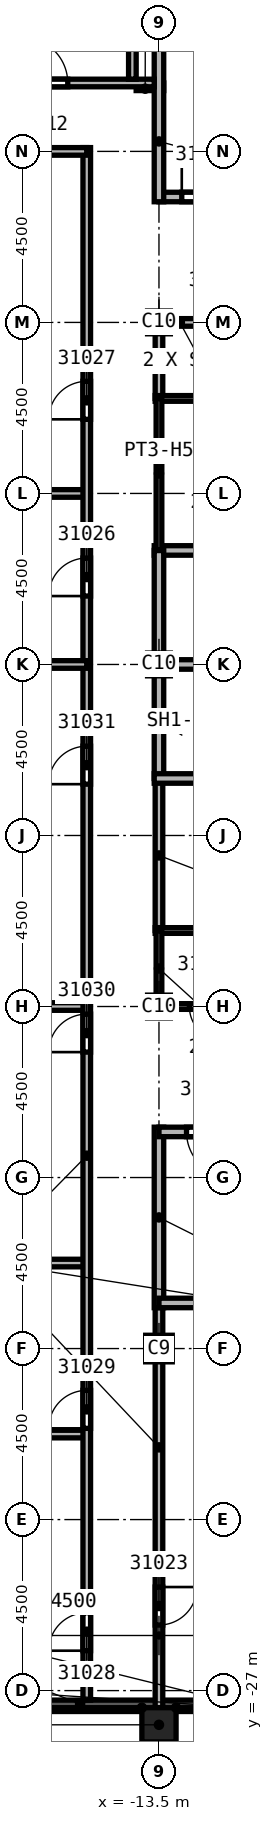
"""IFC4 building model, lengths in metres.
Left out: names, types, materials, properties, quantities, classifications, styles, units other than length and angle.
Written with IfcOpenShell. Run it as: python <this file> out.ifc"""

import sys

from ifc_helpers import new_model, si_unit, direction, frame, frame_2d, origin, origin_2d, place, context, subcontext, project, spatial, rectangle, extrude, element, fill, save


model = new_model("IFC4")
c1 = context("Model", 3, precision=1e-05, world=origin(), true_north=direction((0.0, 1.0)))
c2 = subcontext(c1, "Body", "Model", "MODEL_VIEW")
j1 = project(units=[si_unit("LENGTHUNIT", "METRE"), si_unit("PLANEANGLEUNIT", "RADIAN")], contexts=[c1])
p1 = place(None, origin())
s1 = spatial("IfcSite", under=j1, at=p1, CompositionType="ELEMENT")
p2 = place(p1, origin())
s2 = spatial("IfcBuilding", under=s1, at=p2, CompositionType="ELEMENT")
p3 = place(p2, frame((0.0, 0.0, 350.0)))
s3 = spatial("IfcBuildingStorey", under=s2, at=p3, CompositionType="ELEMENT", Elevation=350.0)
p4 = place(p3, frame((-13.5, -18.0, 0.0), z_axis=(0.0, 0.0, 1.0), x_axis=(1.0, 0.0, 0.0)))
e1 = element("IfcColumn", 1, at=p4, inside=s3, PredefinedType="COLUMN", context=c2, shape_type="SweptSolid", body=[
    extrude(rectangle(XDim=0.7, YDim=0.7, at=origin_2d()), origin(), (0.0, 0.0, 1.0), 5.6),
])
for number, where, z_axis, x_axis in (
    (2, (-13.5, 0.0, 0.0), (0.0, 0.0, 1.0), (1.0, 0.0, 0.0)),
    (3, (-13.5, 9.0, 0.0), (0.0, 0.0, 1.0), (1.0, 0.0, 0.0)),
    (4, (-13.5, -9.0, 0.0), (0.0, 0.0, 1.0), (1.0, 0.0, 0.0)),
):
    element("IfcColumn", number, at=place(p3, frame(where, z_axis=z_axis, x_axis=x_axis)), inside=s3, PredefinedType="COLUMN", context=c2, shape_type="SweptSolid", body=[
        extrude(rectangle(XDim=0.6, YDim=0.6, at=origin_2d()), origin(), (0.0, 0.0, 1.0), 5.6),
    ])
p5 = place(p3, frame((-13.5, -27.9, 0.0), z_axis=(0.0, 0.0, 1.0), x_axis=(1.0, 0.0, 0.0)))
e5 = element("IfcColumn", 5, at=p5, inside=s3, PredefinedType="COLUMN", context=c2, shape_type="SweptSolid", body=[
    extrude(rectangle(XDim=0.9, YDim=0.9, at=origin_2d()), origin(), (0.0, 0.0, 1.0), 5.6),
])
for number, where, z_axis, x_axis in (
    (6, (-17.55, -27.4, 0.0), (0.0, 0.0, 1.0), (1.0, 0.0, 0.0)),
    (7, (-13.45, -27.4, 0.0), (0.0, 0.0, 1.0), (1.0, 0.0, 0.0)),
):
    element("IfcWall", number, at=place(p3, frame(where, z_axis=z_axis, x_axis=x_axis)), inside=s3, PredefinedType="SOLIDWALL", context=c2, shape_type="SweptSolid", body=[
        extrude(rectangle(XDim=4.0, YDim=0.3, at=frame_2d((2.0, 0.0))), origin(), (0.0, 0.0, 1.0), 1.1),
    ])
p6 = place(p3, frame((-26.55, -9.0, 0.0), z_axis=(0.0, 0.0, 1.0), x_axis=(1.0, 0.0, 0.0)))
e8 = element("IfcWall", 8, at=p6, inside=s3, PredefinedType="PARTITIONING", context=c2, shape_type="SweptSolid", body=[
    extrude(rectangle(XDim=11.15, YDim=0.2, at=frame_2d((5.575, 0.0))), origin(), (0.0, 0.0, 1.0), 5.6),
])
p7 = place(p3, frame((-26.35, 4.5, 0.0), z_axis=(0.0, 0.0, 1.0), x_axis=(1.0, 0.0, 0.0)))
e9 = element("IfcWall", 9, at=p7, inside=s3, PredefinedType="PARTITIONING", context=c2, shape_type="SweptSolid", body=[
    extrude(rectangle(XDim=10.95, YDim=0.2, at=frame_2d((5.475, 0.0))), origin(), (0.0, 0.0, 1.0), 5.6),
])
p8 = place(p3, frame((-24.1, -20.25, 0.0), z_axis=(0.0, 0.0, 1.0), x_axis=(1.0, 0.0, 0.0)))
e10 = element("IfcWall", 10, at=p8, inside=s3, PredefinedType="PARTITIONING", context=c2, shape_type="SweptSolid", body=[
    extrude(rectangle(XDim=8.7, YDim=0.2, at=frame_2d((4.35, 0.0))), origin(), (0.0, 0.0, 1.0), 5.6),
])
p9 = place(p3, frame((-20.75, -15.75, 0.0), z_axis=(0.0, 0.0, 1.0), x_axis=(1.0, 0.0, 0.0)))
e11 = element("IfcWall", 11, at=p9, inside=s3, PredefinedType="PARTITIONING", context=c2, shape_type="SweptSolid", body=[
    extrude(rectangle(XDim=5.35, YDim=0.2, at=frame_2d((2.675, 0.0))), origin(), (0.0, 0.0, 1.0), 5.6),
])
p10 = place(p3, frame((-15.4, -27.25, 0.0), z_axis=(0.0, 0.0, 1.0), x_axis=(0.0, 1.0, 0.0)))
e12 = element("IfcWall", 12, at=p10, inside=s3, PredefinedType="PARTITIONING", context=c2, shape_type="SweptSolid", body=[
    extrude(rectangle(XDim=40.85, YDim=0.2, at=frame_2d((20.425, 0.0))), origin(), (0.0, 0.0, 1.0), 5.6),
])
p11 = place(p10, frame((29.05, 0.0, 0.0)))
e13 = element("IfcOpeningElement", 13, at=p11, cuts=e12, PredefinedType="OPENING", context=c2, shape_type="SweptSolid", body=[
    extrude(rectangle(XDim=1.0, YDim=2.1, at=frame_2d((0.5, 1.05))), frame((0.0, 0.1, 0.0), z_axis=(0.0, -1.0, 0.0), x_axis=(1.0, 0.0, 0.0)), (0.0, 0.0, 1.0), 0.2),
])
p12 = place(p10, frame((33.7, 0.0, 0.0)))
e14 = element("IfcOpeningElement", 14, at=p12, cuts=e12, PredefinedType="OPENING", context=c2, shape_type="SweptSolid", body=[
    extrude(rectangle(XDim=1.0, YDim=2.1, at=frame_2d((0.5, 1.05))), frame((0.0, 0.1, 0.0), z_axis=(0.0, -1.0, 0.0), x_axis=(1.0, 0.0, 0.0)), (0.0, 0.0, 1.0), 0.2),
])
p13 = place(p10, frame((1.3, 0.0, 0.0)))
e15 = element("IfcOpeningElement", 15, at=p13, cuts=e12, PredefinedType="OPENING", context=c2, shape_type="SweptSolid", body=[
    extrude(rectangle(XDim=1.0, YDim=2.1, at=frame_2d((0.5, 1.05))), frame((0.0, 0.1, 0.0), z_axis=(0.0, -1.0, 0.0), x_axis=(1.0, 0.0, 0.0)), (0.0, 0.0, 1.0), 0.2),
])
p14 = place(p10, frame((7.15, 0.0, 0.0)))
e16 = element("IfcOpeningElement", 16, at=p14, cuts=e12, PredefinedType="OPENING", context=c2, shape_type="SweptSolid", body=[
    extrude(rectangle(XDim=1.0, YDim=2.1, at=frame_2d((0.5, 1.05))), frame((0.0, 0.1, 0.0), z_axis=(0.0, -1.0, 0.0), x_axis=(1.0, 0.0, 0.0)), (0.0, 0.0, 1.0), 0.2),
])
p15 = place(p10, frame((17.05, 0.0, 0.0)))
e17 = element("IfcOpeningElement", 17, at=p15, cuts=e12, PredefinedType="OPENING", context=c2, shape_type="SweptSolid", body=[
    extrude(rectangle(XDim=1.0, YDim=2.1, at=frame_2d((0.5, 1.05))), frame((0.0, 0.1, 0.0), z_axis=(0.0, -1.0, 0.0), x_axis=(1.0, 0.0, 0.0)), (0.0, 0.0, 1.0), 0.2),
])
p16 = place(p10, frame((24.1, 0.0, 0.0)))
e18 = element("IfcOpeningElement", 18, at=p16, cuts=e12, PredefinedType="OPENING", context=c2, shape_type="SweptSolid", body=[
    extrude(rectangle(XDim=1.0, YDim=2.1, at=frame_2d((0.5, 1.05))), frame((0.0, 0.1, 0.0), z_axis=(0.0, -1.0, 0.0), x_axis=(1.0, 0.0, 0.0)), (0.0, 0.0, 1.0), 0.2),
])
p17 = place(p3, frame((-15.4, 0.0, 0.0), z_axis=(0.0, 0.0, 1.0), x_axis=(-1.0, 0.0, 0.0)))
e19 = element("IfcWall", 19, at=p17, inside=s3, PredefinedType="PARTITIONING", context=c2, shape_type="SweptSolid", body=[
    extrude(rectangle(XDim=11.15, YDim=0.2, at=frame_2d((5.575, 0.0))), origin(), (0.0, 0.0, 1.0), 5.6),
])
p18 = place(p3, frame((-15.4, 13.5, 0.0), z_axis=(0.0, 0.0, 1.0), x_axis=(-1.0, 0.0, 0.0)))
e20 = element("IfcWall", 20, at=p18, inside=s3, PredefinedType="PARTITIONING", context=c2, shape_type="SweptSolid", body=[
    extrude(rectangle(XDim=6.6, YDim=0.2, at=frame_2d((3.3, 0.0))), origin(), (0.0, 0.0, 1.0), 5.6),
])
p19 = place(p3, frame((-14.1, 15.2, 0.0), z_axis=(0.0, 0.0, 1.0), x_axis=(1.0, 0.0, 0.0)))
e21 = element("IfcWall", 21, at=p19, inside=s3, PredefinedType="PARTITIONING", context=c2, shape_type="SweptSolid", body=[
    extrude(rectangle(XDim=0.725, YDim=0.2, at=frame_2d((0.363, 0.0))), origin(), (0.0, 0.0, 1.0), 5.6),
])
p20 = place(p3, frame((-13.5, -16.675, 0.0), z_axis=(0.0, 0.0, 1.0), x_axis=(0.0, -1.0, 0.0)))
e22 = element("IfcWall", 22, at=p20, inside=s3, PredefinedType="PARTITIONING", context=c2, shape_type="SweptSolid", body=[
    extrude(rectangle(XDim=10.775, YDim=0.2, at=frame_2d((5.387, 0.0))), origin(), (0.0, 0.0, 1.0), 5.6),
])
p21 = place(p20, frame((7.6, 0.0, 0.0)))
e23 = element("IfcOpeningElement", 23, at=p21, cuts=e22, PredefinedType="OPENING", context=c2, shape_type="SweptSolid", body=[
    extrude(rectangle(XDim=1.0, YDim=2.1, at=frame_2d((0.5, 1.05))), frame((0.0, 0.1, 0.0), z_axis=(0.0, -1.0, 0.0), x_axis=(1.0, 0.0, 0.0)), (0.0, 0.0, 1.0), 0.2),
])
p22 = place(p3, frame((-13.5, -7.0, 0.0), z_axis=(0.0, 0.0, 1.0), x_axis=(0.0, 1.0, 0.0)))
e24 = element("IfcWall", 24, at=p22, inside=s3, PredefinedType="SOLIDWALL", context=c2, shape_type="SweptSolid", body=[
    extrude(rectangle(XDim=4.0, YDim=0.2, at=frame_2d((2.0, 0.0))), origin(), (0.0, 0.0, 1.0), 4.838),
])
p23 = place(p3, frame((-13.5, 7.0, 0.0), z_axis=(0.0, 0.0, 1.0), x_axis=(0.0, 1.0, 0.0)))
e25 = element("IfcWall", 25, at=p23, inside=s3, PredefinedType="SOLIDWALL", context=c2, shape_type="SweptSolid", body=[
    extrude(rectangle(XDim=2.1, YDim=0.2, at=frame_2d((1.05, 0.0))), origin(), (0.0, 0.0, 1.0), 4.838),
])
p24 = place(p3, frame((-13.5, 9.0, 0.0), z_axis=(0.0, 0.0, 1.0), x_axis=(1.0, 0.0, 0.0)))
e26 = element("IfcWall", 26, at=p24, inside=s3, PredefinedType="SOLIDWALL", context=c2, shape_type="SweptSolid", body=[
    extrude(rectangle(XDim=3.0, YDim=0.2, at=frame_2d((1.5, 0.0))), origin(), (0.0, 0.0, 1.0), 4.838),
])
p25 = place(p24, frame((1.0, 0.0, 0.0)))
e27 = element("IfcOpeningElement", 27, at=p25, cuts=e26, PredefinedType="OPENING", context=c2, shape_type="SweptSolid", body=[
    extrude(rectangle(XDim=1.1, YDim=2.1, at=frame_2d((0.55, 1.05))), frame((0.0, 0.1, 0.0), z_axis=(0.0, -1.0, 0.0), x_axis=(1.0, 0.0, 0.0)), (0.0, 0.0, 1.0), 0.2),
])
p26 = place(p3, frame((-13.625, 0.0, 0.0), z_axis=(0.0, 0.0, 1.0), x_axis=(1.0, 0.0, 0.0)))
e28 = element("IfcWall", 28, at=p26, inside=s3, PredefinedType="SOLIDWALL", context=c2, shape_type="SweptSolid", body=[
    extrude(rectangle(XDim=3.125, YDim=0.25, at=frame_2d((1.562, 0.0))), origin(), (0.0, 0.0, 1.0), 5.6),
])
p27 = place(p3, frame((-13.625, 3.0, 0.0), z_axis=(0.0, 0.0, 1.0), x_axis=(1.0, 0.0, 0.0)))
e29 = element("IfcWall", 29, at=p27, inside=s3, PredefinedType="SOLIDWALL", context=c2, shape_type="SweptSolid", body=[
    extrude(rectangle(XDim=6.125, YDim=0.25, at=frame_2d((3.062, 0.0))), origin(), (0.0, 0.0, 1.0), 5.6),
])
p28 = place(p27, frame((4.0, 0.0, 0.0)))
e30 = element("IfcOpeningElement", 30, at=p28, cuts=e29, PredefinedType="OPENING", context=c2, shape_type="SweptSolid", body=[
    extrude(rectangle(XDim=1.1, YDim=2.1, at=frame_2d((0.55, 1.05))), frame((0.0, 0.125, 0.0), z_axis=(0.0, -1.0, 0.0), x_axis=(1.0, 0.0, 0.0)), (0.0, 0.0, 1.0), 0.25),
])
p29 = place(p3, frame((-13.5, -3.0, 0.0), z_axis=(0.0, 0.0, 1.0), x_axis=(0.0, 1.0, 0.0)))
e31 = element("IfcWall", 31, at=p29, inside=s3, PredefinedType="SOLIDWALL", context=c2, shape_type="SweptSolid", body=[
    extrude(rectangle(XDim=6.0, YDim=0.25, at=frame_2d((3.0, 0.0))), origin(), (0.0, 0.0, 1.0), 4.838),
])
p30 = place(p3, frame((-13.625, -3.0, 0.0), z_axis=(0.0, 0.0, 1.0), x_axis=(1.0, 0.0, 0.0)))
e32 = element("IfcWall", 32, at=p30, inside=s3, PredefinedType="SOLIDWALL", context=c2, shape_type="SweptSolid", body=[
    extrude(rectangle(XDim=6.125, YDim=0.25, at=frame_2d((3.062, 0.0))), origin(), (0.0, 0.0, 1.0), 5.6),
])
p31 = place(p30, frame((4.0, 0.0, 0.0)))
e33 = element("IfcOpeningElement", 33, at=p31, cuts=e32, PredefinedType="OPENING", context=c2, shape_type="SweptSolid", body=[
    extrude(rectangle(XDim=1.1, YDim=2.1, at=frame_2d((0.55, 1.05))), frame((0.0, 0.125, 0.0), z_axis=(0.0, -1.0, 0.0), x_axis=(1.0, 0.0, 0.0)), (0.0, 0.0, 1.0), 0.25),
])
p32 = place(p3, frame((-13.5, -12.175, 0.0), z_axis=(0.0, 0.0, 1.0), x_axis=(0.0, -1.0, 0.0)))
e34 = element("IfcWall", 34, at=p32, inside=s3, PredefinedType="SOLIDWALL", context=c2, shape_type="SweptSolid", body=[
    extrude(rectangle(XDim=4.75, YDim=0.25, at=frame_2d((2.375, 0.0))), origin(), (0.0, 0.0, 1.0), 5.6),
])
p33 = place(p3, frame((-13.5, 12.3, 0.0), z_axis=(0.0, 0.0, 1.0), x_axis=(1.0, 0.0, 0.0)))
e35 = element("IfcWall", 35, at=p33, inside=s3, PredefinedType="SOLIDWALL", context=c2, shape_type="SweptSolid", body=[
    extrude(rectangle(XDim=9.125, YDim=0.25, at=frame_2d((4.562, 0.0))), origin(), (0.0, 0.0, 1.0), 5.6),
])
p34 = place(p33, frame((0.6, 0.0, 0.0)))
e36 = element("IfcOpeningElement", 36, at=p34, cuts=e35, PredefinedType="OPENING", context=c2, shape_type="SweptSolid", body=[
    extrude(rectangle(XDim=1.2, YDim=2.1, at=frame_2d((0.6, 1.05))), frame((0.0, 0.125, 0.0), z_axis=(0.0, -1.0, 0.0), x_axis=(1.0, 0.0, 0.0)), (0.0, 0.0, 1.0), 0.25),
])
p35 = place(p3, frame((-13.5, 12.175, 0.0), z_axis=(0.0, 0.0, 1.0), x_axis=(0.0, 1.0, 0.0)))
e37 = element("IfcWall", 37, at=p35, inside=s3, PredefinedType="SOLIDWALL", context=c2, shape_type="SweptSolid", body=[
    extrude(rectangle(XDim=4.75, YDim=0.25, at=frame_2d((2.375, 0.0))), origin(), (0.0, 0.0, 1.0), 5.6),
])
p36 = place(p3, frame((-4.4, -16.8, 0.0), z_axis=(0.0, 0.0, 1.0), x_axis=(-1.0, 0.0, 0.0)))
e38 = element("IfcWall", 38, at=p36, inside=s3, PredefinedType="SOLIDWALL", context=c2, shape_type="SweptSolid", body=[
    extrude(rectangle(XDim=9.1, YDim=0.25, at=frame_2d((4.55, 0.0))), origin(), (0.0, 0.0, 1.0), 5.6),
])
p37 = place(p3, frame((-4.375, -12.3, 0.0), z_axis=(0.0, 0.0, 1.0), x_axis=(-1.0, 0.0, 0.0)))
e39 = element("IfcWall", 39, at=p37, inside=s3, PredefinedType="SOLIDWALL", context=c2, shape_type="SweptSolid", body=[
    extrude(rectangle(XDim=9.125, YDim=0.25, at=frame_2d((4.562, 0.0))), origin(), (0.0, 0.0, 1.0), 5.6),
])
p38 = place(p37, frame((7.2, 0.0, 0.0)))
e40 = element("IfcOpeningElement", 40, at=p38, cuts=e39, PredefinedType="OPENING", context=c2, shape_type="SweptSolid", body=[
    extrude(rectangle(XDim=1.2, YDim=2.1, at=frame_2d((0.6, 1.05))), frame((0.0, 0.125, 0.0), z_axis=(0.0, -1.0, 0.0), x_axis=(1.0, 0.0, 0.0)), (0.0, 0.0, 1.0), 0.25),
])
for number, where, z_axis, x_axis in (
    (41, (-13.6, -7.0, 0.0), (0.0, 0.0, 1.0), (1.0, 0.0, 0.0)),
    (42, (-13.6, 7.0, 0.0), (0.0, 0.0, 1.0), (1.0, 0.0, 0.0)),
):
    element("IfcWall", number, at=place(p3, frame(where, z_axis=z_axis, x_axis=x_axis)), inside=s3, PredefinedType="PARTITIONING", context=c2, shape_type="SweptSolid", body=[
        extrude(rectangle(XDim=3.1, YDim=0.15, at=frame_2d((1.55, 0.0))), origin(), (0.0, 0.0, 1.0), 5.6),
    ])
p39 = place(p3, frame((-13.5, -9.075, 0.0), z_axis=(0.0, 0.0, 1.0), x_axis=(0.0, 1.0, 0.0)))
e43 = element("IfcWall", 43, at=p39, inside=s3, PredefinedType="PARTITIONING", context=c2, shape_type="SweptSolid", body=[
    extrude(rectangle(XDim=2.075, YDim=0.15, at=frame_2d((1.038, 0.0))), origin(), (0.0, 0.0, 1.0), 4.838),
])
p40 = place(p3, frame((-13.5, 3.0, 0.0), z_axis=(0.0, 0.0, 1.0), x_axis=(0.0, 1.0, 0.0)))
e44 = element("IfcWall", 44, at=p40, inside=s3, PredefinedType="PARTITIONING", context=c2, shape_type="SweptSolid", body=[
    extrude(rectangle(XDim=4.0, YDim=0.15, at=frame_2d((2.0, 0.0))), origin(), (0.0, 0.0, 1.0), 4.838),
])
p41 = place(p3, frame((-10.5, -9.0, 0.0), z_axis=(0.0, 0.0, 1.0), x_axis=(-1.0, 0.0, 0.0)))
e45 = element("IfcWall", 45, at=p41, inside=s3, PredefinedType="PARTITIONING", context=c2, shape_type="SweptSolid", body=[
    extrude(rectangle(XDim=3.0, YDim=0.15, at=frame_2d((1.5, 0.0))), origin(), (0.0, 0.0, 1.0), 4.838),
])
p42 = place(p41, frame((1.3, 0.0, 0.0)))
e46 = element("IfcOpeningElement", 46, at=p42, cuts=e45, PredefinedType="OPENING", context=c2, shape_type="SweptSolid", body=[
    extrude(rectangle(XDim=0.9, YDim=2.1, at=frame_2d((0.45, 1.05))), frame((0.0, 0.075, 0.0), z_axis=(0.0, -1.0, 0.0), x_axis=(1.0, 0.0, 0.0)), (0.0, 0.0, 1.0), 0.15),
])
p43 = place(p3, frame((-21.9, 15.3, 0.0), z_axis=(0.0, 0.0, 1.0), x_axis=(1.0, 0.0, 0.0)))
e47 = element("IfcWall", 47, at=p43, inside=s3, PredefinedType="SOLIDWALL", context=c2, shape_type="SweptSolid", body=[
    extrude(rectangle(XDim=8.275, YDim=0.2, at=frame_2d((4.137, 0.0))), origin(), (0.0, 0.0, 1.0), 5.6),
])
p44 = place(p43, frame((4.8, 0.0, 0.0)))
e48 = element("IfcOpeningElement", 48, at=p44, cuts=e47, PredefinedType="OPENING", context=c2, shape_type="SweptSolid", body=[
    extrude(rectangle(XDim=1.2, YDim=2.1, at=frame_2d((0.6, 1.05))), frame((0.0, 0.1, 0.0), z_axis=(0.0, -1.0, 0.0), x_axis=(1.0, 0.0, 0.0)), (0.0, 0.0, 1.0), 0.2),
])
p45 = place(p3, frame((-14.2, 15.4, 0.0), z_axis=(0.0, 0.0, 1.0), x_axis=(0.0, 1.0, 0.0)))
e49 = element("IfcWall", 49, at=p45, inside=s3, PredefinedType="SOLIDWALL", context=c2, shape_type="SweptSolid", body=[
    extrude(rectangle(XDim=5.9, YDim=0.2, at=frame_2d((2.95, 0.0))), origin(), (0.0, 0.0, 1.0), 5.6),
])
p46 = place(p42, origin())
e50 = element("IfcDoor", 50, at=p46, inside=s3, OperationType="SINGLE_SWING_RIGHT", PredefinedType="DOOR", context=c2, shape_type="SweptSolid", body=[
    extrude(rectangle(XDim=0.9, YDim=2.1, at=frame_2d((0.45, 1.05))), frame((0.0, 0.025, 0.0), z_axis=(0.0, -1.0, 0.0), x_axis=(1.0, 0.0, 0.0)), (0.0, 0.0, 1.0), 0.05),
])
fill(e46, e50)
p47 = place(p34, origin())
e51 = element("IfcDoor", 51, at=p47, inside=s3, OperationType="SINGLE_SWING_RIGHT", PredefinedType="DOOR", context=c2, shape_type="SweptSolid", body=[
    extrude(rectangle(XDim=1.2, YDim=2.1, at=frame_2d((0.6, 1.05))), frame((0.0, 0.025, 0.0), z_axis=(0.0, -1.0, 0.0), x_axis=(1.0, 0.0, 0.0)), (0.0, 0.0, 1.0), 0.05),
])
fill(e36, e51)
p48 = place(p38, origin())
e52 = element("IfcDoor", 52, at=p48, inside=s3, OperationType="SINGLE_SWING_LEFT", PredefinedType="DOOR", context=c2, shape_type="SweptSolid", body=[
    extrude(rectangle(XDim=1.2, YDim=2.1, at=frame_2d((0.6, 1.05))), frame((0.0, 0.025, 0.0), z_axis=(0.0, -1.0, 0.0), x_axis=(1.0, 0.0, 0.0)), (0.0, 0.0, 1.0), 0.05),
])
fill(e40, e52)
p49 = place(p21, origin())
e53 = element("IfcDoor", 53, at=p49, inside=s3, OperationType="SINGLE_SWING_RIGHT", PredefinedType="DOOR", context=c2, shape_type="SweptSolid", body=[
    extrude(rectangle(XDim=1.0, YDim=2.1, at=frame_2d((0.5, 1.05))), frame((0.0, 0.025, 0.0), z_axis=(0.0, -1.0, 0.0), x_axis=(1.0, 0.0, 0.0)), (0.0, 0.0, 1.0), 0.05),
])
fill(e23, e53)
p50 = place(p11, origin())
e54 = element("IfcDoor", 54, at=p50, inside=s3, OperationType="SINGLE_SWING_LEFT", PredefinedType="DOOR", context=c2, shape_type="SweptSolid", body=[
    extrude(rectangle(XDim=1.0, YDim=2.1, at=frame_2d((0.5, 1.05))), frame((0.0, 0.025, 0.0), z_axis=(0.0, -1.0, 0.0), x_axis=(1.0, 0.0, 0.0)), (0.0, 0.0, 1.0), 0.05),
])
fill(e13, e54)
p51 = place(p12, origin())
e55 = element("IfcDoor", 55, at=p51, inside=s3, OperationType="SINGLE_SWING_RIGHT", PredefinedType="DOOR", context=c2, shape_type="SweptSolid", body=[
    extrude(rectangle(XDim=1.0, YDim=2.1, at=frame_2d((0.5, 1.05))), frame((0.0, 0.025, 0.0), z_axis=(0.0, -1.0, 0.0), x_axis=(1.0, 0.0, 0.0)), (0.0, 0.0, 1.0), 0.05),
])
fill(e14, e55)
p52 = place(p13, origin())
e56 = element("IfcDoor", 56, at=p52, inside=s3, OperationType="SINGLE_SWING_LEFT", PredefinedType="DOOR", context=c2, shape_type="SweptSolid", body=[
    extrude(rectangle(XDim=1.0, YDim=2.1, at=frame_2d((0.5, 1.05))), frame((0.0, 0.025, 0.0), z_axis=(0.0, -1.0, 0.0), x_axis=(1.0, 0.0, 0.0)), (0.0, 0.0, 1.0), 0.05),
])
fill(e15, e56)
p53 = place(p14, origin())
e57 = element("IfcDoor", 57, at=p53, inside=s3, OperationType="SINGLE_SWING_RIGHT", PredefinedType="DOOR", context=c2, shape_type="SweptSolid", body=[
    extrude(rectangle(XDim=1.0, YDim=2.1, at=frame_2d((0.5, 1.05))), frame((0.0, 0.025, 0.0), z_axis=(0.0, -1.0, 0.0), x_axis=(1.0, 0.0, 0.0)), (0.0, 0.0, 1.0), 0.05),
])
fill(e16, e57)
p54 = place(p15, origin())
e58 = element("IfcDoor", 58, at=p54, inside=s3, OperationType="SINGLE_SWING_LEFT", PredefinedType="DOOR", context=c2, shape_type="SweptSolid", body=[
    extrude(rectangle(XDim=1.0, YDim=2.1, at=frame_2d((0.5, 1.05))), frame((0.0, 0.025, 0.0), z_axis=(0.0, -1.0, 0.0), x_axis=(1.0, 0.0, 0.0)), (0.0, 0.0, 1.0), 0.05),
])
fill(e17, e58)
p55 = place(p16, origin())
e59 = element("IfcDoor", 59, at=p55, inside=s3, OperationType="SINGLE_SWING_RIGHT", PredefinedType="DOOR", context=c2, shape_type="SweptSolid", body=[
    extrude(rectangle(XDim=1.0, YDim=2.1, at=frame_2d((0.5, 1.05))), frame((0.0, 0.025, 0.0), z_axis=(0.0, -1.0, 0.0), x_axis=(1.0, 0.0, 0.0)), (0.0, 0.0, 1.0), 0.05),
])
fill(e18, e59)
p56 = place(p44, origin())
e60 = element("IfcDoor", 60, at=p56, inside=s3, OperationType="SINGLE_SWING_RIGHT", PredefinedType="DOOR", context=c2, shape_type="SweptSolid", body=[
    extrude(rectangle(XDim=1.2, YDim=2.1, at=frame_2d((0.6, 1.05))), frame((0.0, 0.025, 0.0), z_axis=(0.0, -1.0, 0.0), x_axis=(1.0, 0.0, 0.0)), (0.0, 0.0, 1.0), 0.05),
])
fill(e48, e60)
save(model, sys.argv[1])
